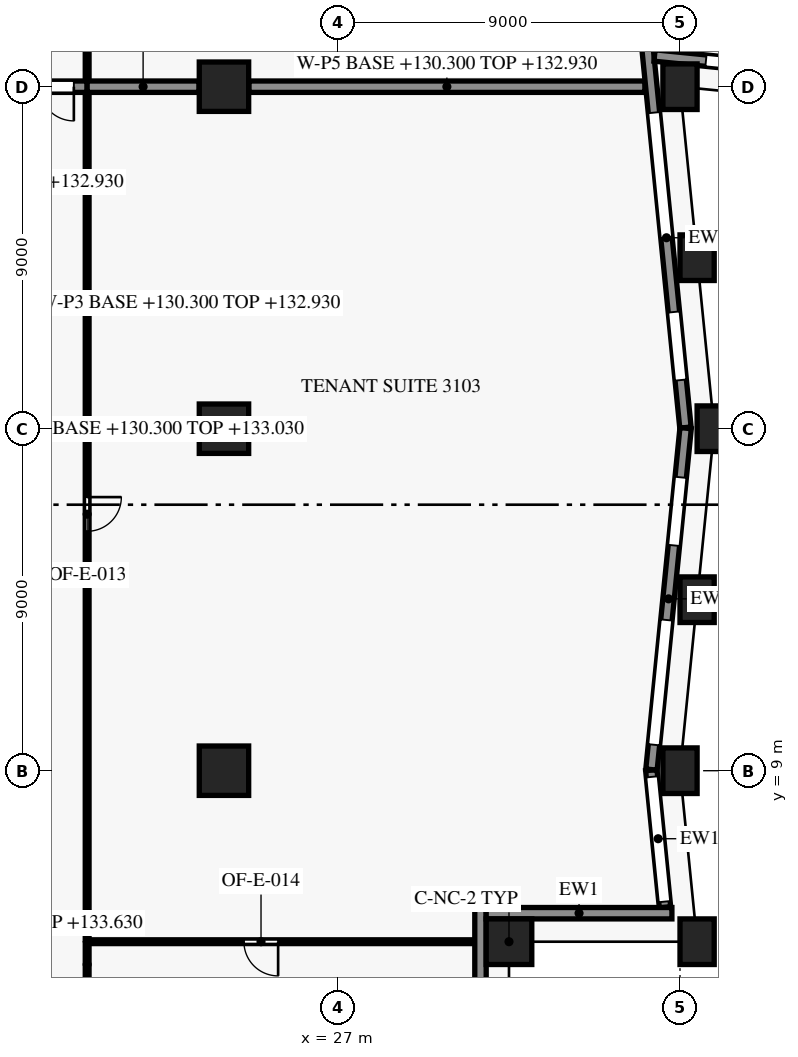
"""IFC4 building model, lengths in metres.
Left out: names, types, materials, properties, quantities, classifications, styles, units other than length and angle.
Written with IfcOpenShell. Run it as: python <this file> out.ifc"""

import sys

from ifc_helpers import new_model, si_unit, direction, frame, frame_2d, origin, origin_2d, place, context, subcontext, project, spatial, rectangle, extrude, element, fill, save


model = new_model("IFC4")
c1 = context("Model", 3, precision=1e-05, world=origin(), true_north=direction((0.0, 1.0)))
c2 = subcontext(c1, "Body", "Model", "MODEL_VIEW")
j1 = project(units=[si_unit("LENGTHUNIT", "METRE"), si_unit("PLANEANGLEUNIT", "RADIAN")], contexts=[c1])
p1 = place(None, origin())
s1 = spatial("IfcSite", under=j1, at=p1, CompositionType="ELEMENT")
p2 = place(p1, origin())
s2 = spatial("IfcBuilding", under=s1, at=p2, CompositionType="ELEMENT")
p3 = place(p2, frame((0.0, 0.0, 130.3)))
s3 = spatial("IfcBuildingStorey", under=s2, at=p3, CompositionType="ELEMENT", Elevation=130.3)
for number, where, z_axis, x_axis in (
    (1, (36.45, 4.5, 0.0), (0.0, 0.0, 1.0), (-0.1, 0.995, 0.0)),
    (2, (36.0, 9.0, 0.0), (0.0, 0.0, 1.0), (0.0, 1.0, 0.0)),
    (3, (36.45, 13.5, 0.0), (0.0, 0.0, 1.0), (0.1, 0.995, 0.0)),
    (4, (36.9, 18.0, 0.0), (0.0, 0.0, 1.0), (0.0, 1.0, 0.0)),
    (5, (36.45, 22.5, 0.0), (0.0, 0.0, 1.0), (-0.1, 0.995, 0.0)),
    (6, (36.0, 27.0, 0.0), (0.0, 0.0, 1.0), (-0.1, 0.995, 0.0)),
):
    element("IfcColumn", number, at=place(p3, frame(where, z_axis=z_axis, x_axis=x_axis)), inside=s3, PredefinedType="COLUMN", context=c2, shape_type="SweptSolid", body=[
        extrude(rectangle(XDim=0.9, YDim=1.2, at=origin_2d()), origin(), (0.0, 0.0, 1.0), 3.8),
    ])
p4 = place(p3, frame((31.5, 4.5, 0.0), z_axis=(0.0, 0.0, 1.0), x_axis=(1.0, 0.0, 0.0)))
e7 = element("IfcColumn", 7, at=p4, inside=s3, PredefinedType="COLUMN", context=c2, shape_type="SweptSolid", body=[
    extrude(rectangle(XDim=1.2, YDim=1.2, at=origin_2d()), origin(), (0.0, 0.0, 1.0), 3.8),
])
for number, where, z_axis, x_axis in (
    (8, (24.0, 9.0, 0.0), (0.0, 0.0, 1.0), (1.0, 0.0, 0.0)),
    (9, (24.0, 18.0, 0.0), (0.0, 0.0, 1.0), (1.0, 0.0, 0.0)),
    (10, (24.0, 27.0, 0.0), (0.0, 0.0, 1.0), (1.0, 0.0, 0.0)),
):
    element("IfcColumn", number, at=place(p3, frame(where, z_axis=z_axis, x_axis=x_axis)), inside=s3, PredefinedType="COLUMN", context=c2, shape_type="SweptSolid", body=[
        extrude(rectangle(XDim=1.3, YDim=1.3, at=origin_2d()), origin(), (0.0, 0.0, 1.0), 3.8),
    ])
p5 = place(p3, frame((30.75, 5.4, 0.0), z_axis=(0.0, 0.0, 1.0), x_axis=(0.0, -1.0, 0.0)))
e11 = element("IfcWall", 11, at=p5, inside=s3, PredefinedType="SOLIDWALL", context=c2, shape_type="SweptSolid", body=[
    extrude(rectangle(XDim=4.502, YDim=0.3, at=frame_2d((2.251, 0.0))), origin(), (0.0, 0.0, 1.0), 3.15),
])
p6 = place(p3, frame((35.787, 5.25, 0.0), z_axis=(0.0, 0.0, 1.0), x_axis=(-1.0, 0.0, 0.0)))
e12 = element("IfcWall", 12, at=p6, inside=s3, PredefinedType="SOLIDWALL", context=c2, shape_type="SweptSolid", body=[
    extrude(rectangle(XDim=4.887, YDim=0.3, at=frame_2d((2.444, 0.0))), origin(), (0.0, 0.0, 1.0), 3.15),
])
p7 = place(p3, frame((35.245, 9.015, 0.0), z_axis=(0.0, 0.0, 1.0), x_axis=(0.099470401798, -0.995040521369, 0.0)))
e13 = element("IfcWall", 13, at=p7, inside=s3, PredefinedType="SOLIDWALL", context=c2, shape_type="SweptSolid", body=[
    extrude(rectangle(XDim=3.628, YDim=0.3, at=frame_2d((1.814, 0.0))), origin(), (0.0, 0.0, 1.0), 3.15),
])
p8 = place(p7, frame((0.178, 0.0, 0.15)))
e14 = element("IfcOpeningElement", 14, at=p8, cuts=e13, PredefinedType="OPENING", context=c2, shape_type="SweptSolid", body=[
    extrude(rectangle(XDim=3.3, YDim=2.4, at=frame_2d((1.65, 1.2))), frame((0.0, 0.16, 0.0), z_axis=(0.0, -1.0, 0.0), x_axis=(1.0, 0.0, 0.0)), (0.0, 0.0, 1.0), 0.32),
])
p9 = place(p3, frame((36.148, 18.015, 0.0), z_axis=(0.0, 0.0, 1.0), x_axis=(-0.099495688264, -0.995037993253, 0.0)))
e15 = element("IfcWall", 15, at=p9, inside=s3, PredefinedType="SOLIDWALL", context=c2, shape_type="SweptSolid", body=[
    extrude(rectangle(XDim=9.03, YDim=0.3, at=frame_2d((4.515, 0.0))), origin(), (0.0, 0.0, 1.0), 3.15),
])
p10 = place(p9, frame((1.301, 0.0, 0.75)))
e16 = element("IfcOpeningElement", 16, at=p10, cuts=e15, PredefinedType="OPENING", context=c2, shape_type="SweptSolid", body=[
    extrude(rectangle(XDim=1.8, YDim=1.8, at=frame_2d((0.9, 0.9))), frame((0.0, 0.16, 0.0), z_axis=(0.0, -1.0, 0.0), x_axis=(1.0, 0.0, 0.0)), (0.0, 0.0, 1.0), 0.32),
])
p11 = place(p9, frame((5.073, 0.0, 0.15)))
e17 = element("IfcOpeningElement", 17, at=p11, cuts=e15, PredefinedType="OPENING", context=c2, shape_type="SweptSolid", body=[
    extrude(rectangle(XDim=3.3, YDim=2.4, at=frame_2d((1.65, 1.2))), frame((0.0, 0.16, 0.0), z_axis=(0.0, -1.0, 0.0), x_axis=(1.0, 0.0, 0.0)), (0.0, 0.0, 1.0), 0.32),
])
p12 = place(p3, frame((35.144, 28.02, 0.0), z_axis=(0.0, 0.0, 1.0), x_axis=(0.099503719021, -0.99503719021, 0.0)))
e18 = element("IfcWall", 18, at=p12, inside=s3, PredefinedType="SOLIDWALL", context=c2, shape_type="SweptSolid", body=[
    extrude(rectangle(XDim=10.04, YDim=0.3, at=frame_2d((5.02, 0.0))), origin(), (0.0, 0.0, 1.0), 3.15),
])
p13 = place(p12, frame((1.711, 0.0, 0.15)))
e19 = element("IfcOpeningElement", 19, at=p13, cuts=e18, PredefinedType="OPENING", context=c2, shape_type="SweptSolid", body=[
    extrude(rectangle(XDim=3.3, YDim=2.4, at=frame_2d((1.65, 1.2))), frame((0.0, 0.16, 0.0), z_axis=(0.0, -1.0, 0.0), x_axis=(1.0, 0.0, 0.0)), (0.0, 0.0, 1.0), 0.32),
])
p14 = place(p12, frame((6.984, 0.0, 0.75)))
e20 = element("IfcOpeningElement", 20, at=p14, cuts=e18, PredefinedType="OPENING", context=c2, shape_type="SweptSolid", body=[
    extrude(rectangle(XDim=1.8, YDim=1.8, at=frame_2d((0.9, 0.9))), frame((0.0, 0.16, 0.0), z_axis=(0.0, -1.0, 0.0), x_axis=(1.0, 0.0, 0.0)), (0.0, 0.0, 1.0), 0.32),
])
p15 = place(p3, frame((45.015, 26.852, 0.0), z_axis=(0.0, 0.0, 1.0), x_axis=(-0.995037438546, 0.099501235631, 0.0)))
e21 = element("IfcWall", 21, at=p15, inside=s3, PredefinedType="SOLIDWALL", context=c2, shape_type="SweptSolid", body=[
    extrude(rectangle(XDim=9.734, YDim=0.3, at=frame_2d((4.867, 0.0))), origin(), (0.0, 0.0, 1.0), 3.15),
])
p16 = place(p15, frame((1.301, 0.0, 0.75)))
e22 = element("IfcOpeningElement", 22, at=p16, cuts=e21, PredefinedType="OPENING", context=c2, shape_type="SweptSolid", body=[
    extrude(rectangle(XDim=1.8, YDim=1.8, at=frame_2d((0.9, 0.9))), frame((0.0, 0.16, 0.0), z_axis=(0.0, -1.0, 0.0), x_axis=(1.0, 0.0, 0.0)), (0.0, 0.0, 1.0), 0.32),
])
p17 = place(p15, frame((5.073, 0.0, 0.15)))
e23 = element("IfcOpeningElement", 23, at=p17, cuts=e21, PredefinedType="OPENING", context=c2, shape_type="SweptSolid", body=[
    extrude(rectangle(XDim=3.3, YDim=2.4, at=frame_2d((1.65, 1.2))), frame((0.0, 0.16, 0.0), z_axis=(0.0, -1.0, 0.0), x_axis=(1.0, 0.0, 0.0)), (0.0, 0.0, 1.0), 0.32),
])
p18 = place(p3, frame((20.4, 4.45, 0.0), z_axis=(0.0, 0.0, 1.0), x_axis=(0.0, -1.0, 0.0)))
e24 = element("IfcWall", 24, at=p18, inside=s3, PredefinedType="PARTITIONING", context=c2, shape_type="SweptSolid", body=[
    extrude(rectangle(XDim=1.1, YDim=0.1, at=frame_2d((0.55, 0.0))), origin(), (0.0, 0.0, 1.0), 3.33),
])
p19 = place(p3, frame((30.58, 4.5, 0.0), z_axis=(0.0, 0.0, 1.0), x_axis=(-1.0, 0.0, 0.0)))
e25 = element("IfcWall", 25, at=p19, inside=s3, PredefinedType="PARTITIONING", context=c2, shape_type="SweptSolid", body=[
    extrude(rectangle(XDim=10.13, YDim=0.1, at=frame_2d((5.065, 0.0))), origin(), (0.0, 0.0, 1.0), 2.63),
])
p20 = place(p19, frame((5.155, 0.0, 0.0)))
e26 = element("IfcOpeningElement", 26, at=p20, cuts=e25, PredefinedType="OPENING", context=c2, shape_type="SweptSolid", body=[
    extrude(rectangle(XDim=0.9, YDim=2.1, at=frame_2d((0.45, 1.05))), frame((0.0, 0.06, 0.0), z_axis=(0.0, -1.0, 0.0), x_axis=(1.0, 0.0, 0.0)), (0.0, 0.0, 1.0), 0.12),
])
p21 = place(p3, frame((20.4, 26.83, 0.0), z_axis=(0.0, 0.0, 1.0), x_axis=(0.0, -1.0, 0.0)))
e27 = element("IfcWall", 27, at=p21, inside=s3, PredefinedType="PARTITIONING", context=c2, shape_type="SweptSolid", body=[
    extrude(rectangle(XDim=22.28, YDim=0.1, at=frame_2d((11.14, 0.0))), origin(), (0.0, 0.0, 1.0), 2.63),
])
p22 = place(p21, frame((10.63, 0.0, 0.0)))
e28 = element("IfcOpeningElement", 28, at=p22, cuts=e27, PredefinedType="OPENING", context=c2, shape_type="SweptSolid", body=[
    extrude(rectangle(XDim=0.9, YDim=2.1, at=frame_2d((0.45, 1.05))), frame((0.0, 0.06, 0.0), z_axis=(0.0, -1.0, 0.0), x_axis=(1.0, 0.0, 0.0)), (0.0, 0.0, 1.0), 0.12),
])
p23 = place(p3, frame((20.4, 27.0, 0.0), z_axis=(0.0, 0.0, 1.0), x_axis=(-1.0, 0.0, 0.0)))
e29 = element("IfcWall", 29, at=p23, inside=s3, PredefinedType="PARTITIONING", context=c2, shape_type="SweptSolid", body=[
    extrude(rectangle(XDim=2.5, YDim=0.3, at=frame_2d((1.25, 0.0))), origin(), (0.0, 0.0, 1.0), 2.63),
])
p24 = place(p23, frame((0.35, 0.0, 0.0)))
e30 = element("IfcOpeningElement", 30, at=p24, cuts=e29, PredefinedType="OPENING", context=c2, shape_type="SweptSolid", body=[
    extrude(rectangle(XDim=1.8, YDim=2.1, at=frame_2d((0.9, 1.05))), frame((0.0, 0.16, 0.0), z_axis=(0.0, -1.0, 0.0), x_axis=(1.0, 0.0, 0.0)), (0.0, 0.0, 1.0), 0.32),
])
p25 = place(p3, frame((20.4, 27.0, 0.0), z_axis=(0.0, 0.0, 1.0), x_axis=(1.0, 0.0, 0.0)))
e31 = element("IfcWall", 31, at=p25, inside=s3, PredefinedType="PARTITIONING", context=c2, shape_type="SweptSolid", body=[
    extrude(rectangle(XDim=2.945, YDim=0.3, at=frame_2d((1.473, 0.0))), origin(), (0.0, 0.0, 1.0), 2.63),
])
for number, where, z_axis, x_axis in (
    (32, (24.655, 27.0, 0.0), (0.0, 0.0, 1.0), (1.0, 0.0, 0.0)),
    (33, (36.0, 27.925, 0.0), (0.0, 0.0, 1.0), (0.0, 1.0, 0.0)),
):
    element("IfcWall", number, at=place(p3, frame(where, z_axis=z_axis, x_axis=x_axis)), inside=s3, PredefinedType="PARTITIONING", context=c2, shape_type="SweptSolid", body=[
        extrude(rectangle(XDim=10.42, YDim=0.3, at=frame_2d((5.21, 0.0))), origin(), (0.0, 0.0, 1.0), 2.63),
    ])
p26 = place(p3, frame((20.4, 33.45, 0.0), z_axis=(0.0, 0.0, 1.0), x_axis=(0.0, -1.0, 0.0)))
e34 = element("IfcWall", 34, at=p26, inside=s3, PredefinedType="PARTITIONING", context=c2, shape_type="SweptSolid", body=[
    extrude(rectangle(XDim=6.28, YDim=0.1, at=frame_2d((3.14, 0.0))), origin(), (0.0, 0.0, 1.0), 2.63),
])
p27 = place(p8, origin())
e35 = element("IfcWindow", 35, at=p27, inside=s3, PartitioningType="SINGLE_PANEL", PredefinedType="WINDOW", context=c2, shape_type="SweptSolid", body=[
    extrude(rectangle(XDim=3.3, YDim=2.4, at=frame_2d((1.65, 1.2))), frame((0.0, 0.03, 0.0), z_axis=(0.0, -1.0, 0.0), x_axis=(1.0, 0.0, 0.0)), (0.0, 0.0, 1.0), 0.06),
])
fill(e14, e35)
p28 = place(p10, origin())
e36 = element("IfcWindow", 36, at=p28, inside=s3, PartitioningType="SINGLE_PANEL", PredefinedType="WINDOW", context=c2, shape_type="SweptSolid", body=[
    extrude(rectangle(XDim=1.8, YDim=1.8, at=frame_2d((0.9, 0.9))), frame((0.0, 0.03, 0.0), z_axis=(0.0, -1.0, 0.0), x_axis=(1.0, 0.0, 0.0)), (0.0, 0.0, 1.0), 0.06),
])
fill(e16, e36)
p29 = place(p11, origin())
e37 = element("IfcWindow", 37, at=p29, inside=s3, PartitioningType="SINGLE_PANEL", PredefinedType="WINDOW", context=c2, shape_type="SweptSolid", body=[
    extrude(rectangle(XDim=3.3, YDim=2.4, at=frame_2d((1.65, 1.2))), frame((0.0, 0.03, 0.0), z_axis=(0.0, -1.0, 0.0), x_axis=(1.0, 0.0, 0.0)), (0.0, 0.0, 1.0), 0.06),
])
fill(e17, e37)
p30 = place(p13, origin())
e38 = element("IfcWindow", 38, at=p30, inside=s3, PartitioningType="SINGLE_PANEL", PredefinedType="WINDOW", context=c2, shape_type="SweptSolid", body=[
    extrude(rectangle(XDim=3.3, YDim=2.4, at=frame_2d((1.65, 1.2))), frame((0.0, 0.03, 0.0), z_axis=(0.0, -1.0, 0.0), x_axis=(1.0, 0.0, 0.0)), (0.0, 0.0, 1.0), 0.06),
])
fill(e19, e38)
p31 = place(p14, origin())
e39 = element("IfcWindow", 39, at=p31, inside=s3, PartitioningType="SINGLE_PANEL", PredefinedType="WINDOW", context=c2, shape_type="SweptSolid", body=[
    extrude(rectangle(XDim=1.8, YDim=1.8, at=frame_2d((0.9, 0.9))), frame((0.0, 0.03, 0.0), z_axis=(0.0, -1.0, 0.0), x_axis=(1.0, 0.0, 0.0)), (0.0, 0.0, 1.0), 0.06),
])
fill(e20, e39)
p32 = place(p17, origin())
e40 = element("IfcWindow", 40, at=p32, inside=s3, PartitioningType="SINGLE_PANEL", PredefinedType="WINDOW", context=c2, shape_type="SweptSolid", body=[
    extrude(rectangle(XDim=3.3, YDim=2.4, at=frame_2d((1.65, 1.2))), frame((0.0, 0.03, 0.0), z_axis=(0.0, -1.0, 0.0), x_axis=(1.0, 0.0, 0.0)), (0.0, 0.0, 1.0), 0.06),
])
fill(e23, e40)
p33 = place(p22, origin())
e41 = element("IfcDoor", 41, at=p33, inside=s3, OperationType="SINGLE_SWING_LEFT", PredefinedType="DOOR", context=c2, shape_type="SweptSolid", body=[
    extrude(rectangle(XDim=0.9, YDim=2.1, at=frame_2d((0.45, 1.05))), frame((0.0, 0.025, 0.0), z_axis=(0.0, -1.0, 0.0), x_axis=(1.0, 0.0, 0.0)), (0.0, 0.0, 1.0), 0.05),
])
fill(e28, e41)
p34 = place(p20, origin())
e42 = element("IfcDoor", 42, at=p34, inside=s3, OperationType="SINGLE_SWING_LEFT", PredefinedType="DOOR", context=c2, shape_type="SweptSolid", body=[
    extrude(rectangle(XDim=0.9, YDim=2.1, at=frame_2d((0.45, 1.05))), frame((0.0, 0.025, 0.0), z_axis=(0.0, -1.0, 0.0), x_axis=(1.0, 0.0, 0.0)), (0.0, 0.0, 1.0), 0.05),
])
fill(e26, e42)
p35 = place(p24, origin())
e43 = element("IfcDoor", 43, at=p35, inside=s3, OperationType="DOUBLE_DOOR_SINGLE_SWING", PredefinedType="DOOR", context=c2, shape_type="SweptSolid", body=[
    extrude(rectangle(XDim=1.8, YDim=2.1, at=frame_2d((0.9, 1.05))), frame((0.0, 0.025, 0.0), z_axis=(0.0, -1.0, 0.0), x_axis=(1.0, 0.0, 0.0)), (0.0, 0.0, 1.0), 0.05),
])
fill(e30, e43)
save(model, sys.argv[1])
